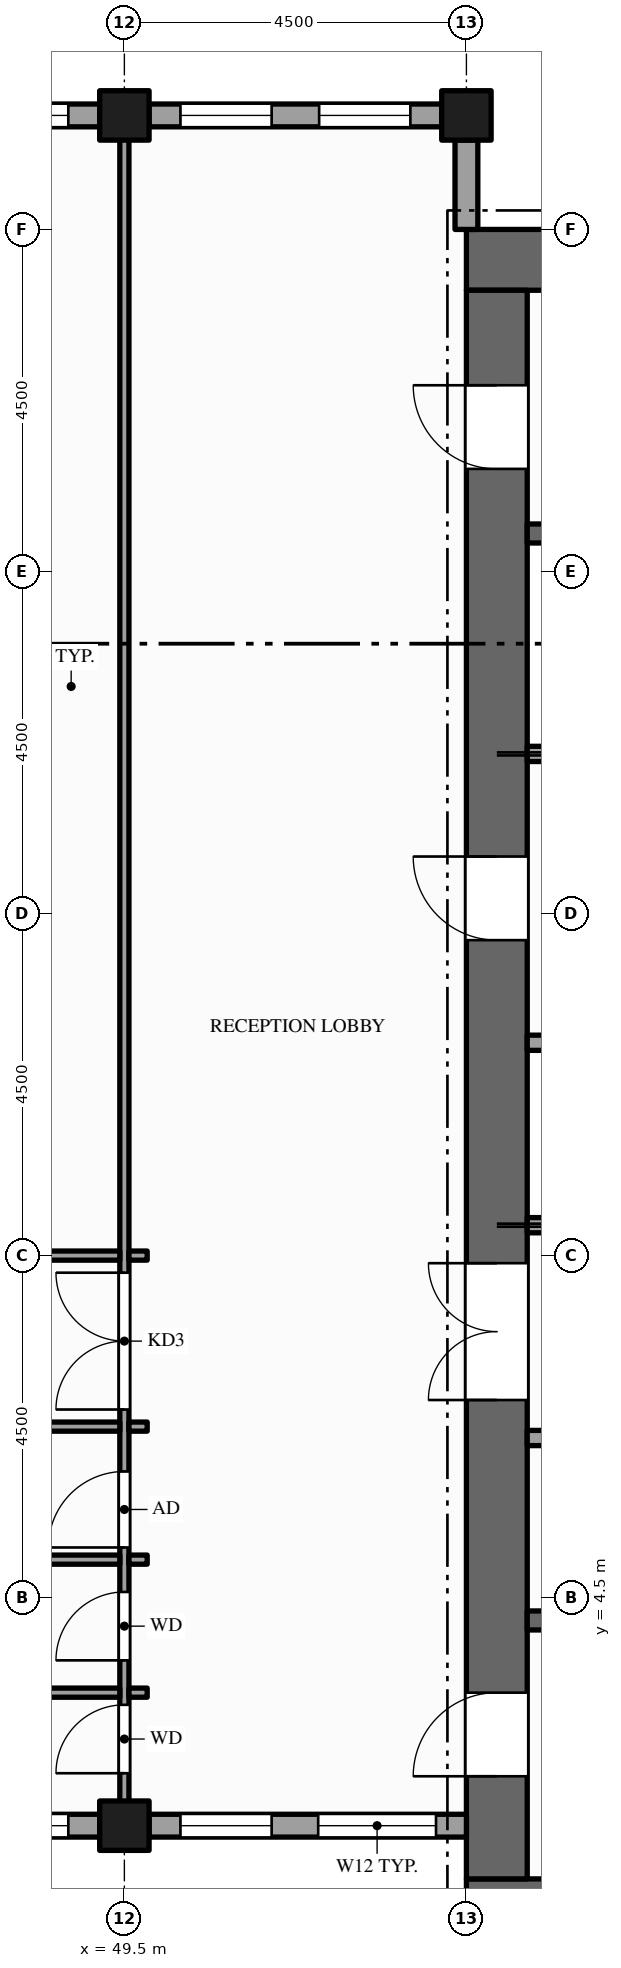
"""IFC4 building model, lengths in metres.
Left out: names, types, materials, properties, quantities, classifications, styles, units other than length and angle.
Written with IfcOpenShell. Run it as: python <this file> out.ifc"""

import sys

from ifc_helpers import new_model, si_unit, direction, frame, frame_2d, origin, origin_2d, place, context, subcontext, project, spatial, rectangle, hollow_rectangle, extrude, element, fill, save


model = new_model("IFC4")
c1 = context("Model", 3, precision=1e-05, world=origin(), true_north=direction((0.0, 1.0)))
c2 = subcontext(c1, "Body", "Model", "MODEL_VIEW")
j1 = project(units=[si_unit("LENGTHUNIT", "METRE"), si_unit("PLANEANGLEUNIT", "RADIAN")], contexts=[c1])
p1 = place(None, origin())
s1 = spatial("IfcSite", under=j1, at=p1, CompositionType="ELEMENT")
p2 = place(p1, origin())
s2 = spatial("IfcBuilding", under=s1, at=p2, CompositionType="ELEMENT")
p3 = place(p2, frame((0.0, 0.0, 273.0)))
s3 = spatial("IfcBuildingStorey", under=s2, at=p3, CompositionType="ELEMENT", Elevation=273.0)
for number, where, z_axis, x_axis in (
    (1, (67.5, 0.4, -0.15), (0.0, 0.0, 1.0), (-1.0, 0.0, 0.0)),
    (2, (54.0, 22.1, -0.15), (0.0, 0.0, 1.0), (1.0, 0.0, 0.0)),
):
    element("IfcWall", number, at=place(p3, frame(where, z_axis=z_axis, x_axis=x_axis)), inside=s3, PredefinedType="SHEAR", context=c2, shape_type="SweptSolid", body=[
        extrude(rectangle(XDim=13.5, YDim=0.8, at=frame_2d((6.75, 0.0))), origin(), (0.0, 0.0, 1.0), 4.0),
    ])
p4 = place(p3, frame((54.4, 0.8, -0.15), z_axis=(0.0, 0.0, 1.0), x_axis=(0.0, 1.0, 0.0)))
e3 = element("IfcWall", 3, at=p4, inside=s3, PredefinedType="SHEAR", context=c2, shape_type="SweptSolid", body=[
    extrude(rectangle(XDim=20.9, YDim=0.8, at=frame_2d((10.45, 0.0))), origin(), (0.0, 0.0, 1.0), 4.0),
])
p5 = place(p4, frame((6.3, 0.0, 0.15)))
e4 = element("IfcOpeningElement", 4, at=p5, cuts=e3, PredefinedType="OPENING", context=c2, shape_type="SweptSolid", body=[
    extrude(rectangle(XDim=1.8, YDim=2.1, at=frame_2d((0.9, 1.05))), frame((0.0, 0.41, 0.0), z_axis=(0.0, -1.0, 0.0), x_axis=(1.0, 0.0, 0.0)), (0.0, 0.0, 1.0), 0.82),
])
p6 = place(p4, frame((12.35, 0.0, 0.15)))
e5 = element("IfcOpeningElement", 5, at=p6, cuts=e3, PredefinedType="OPENING", context=c2, shape_type="SweptSolid", body=[
    extrude(rectangle(XDim=1.1, YDim=2.1, at=frame_2d((0.55, 1.05))), frame((0.0, 0.41, 0.0), z_axis=(0.0, -1.0, 0.0), x_axis=(1.0, 0.0, 0.0)), (0.0, 0.0, 1.0), 0.82),
])
p7 = place(p4, frame((1.35, 0.0, 0.15)))
e6 = element("IfcOpeningElement", 6, at=p7, cuts=e3, PredefinedType="OPENING", context=c2, shape_type="SweptSolid", body=[
    extrude(rectangle(XDim=1.1, YDim=2.1, at=frame_2d((0.55, 1.05))), frame((0.0, 0.41, 0.0), z_axis=(0.0, -1.0, 0.0), x_axis=(1.0, 0.0, 0.0)), (0.0, 0.0, 1.0), 0.82),
])
p8 = place(p4, frame((18.55, 0.0, 0.15)))
e7 = element("IfcOpeningElement", 7, at=p8, cuts=e3, PredefinedType="OPENING", context=c2, shape_type="SweptSolid", body=[
    extrude(rectangle(XDim=1.1, YDim=2.1, at=frame_2d((0.55, 1.05))), frame((0.0, 0.41, 0.0), z_axis=(0.0, -1.0, 0.0), x_axis=(1.0, 0.0, 0.0)), (0.0, 0.0, 1.0), 0.82),
])
for number, where, z_axis, x_axis in (
    (8, (49.5, 1.5, -0.15), (0.0, 0.0, 1.0), (1.0, 0.0, 0.0)),
    (9, (49.5, 24.0, -0.15), (0.0, 0.0, 1.0), (1.0, 0.0, 0.0)),
    (10, (54.0, 24.0, -0.15), (0.0, 0.0, 1.0), (1.0, 0.0, 0.0)),
):
    element("IfcColumn", number, at=place(p3, frame(where, z_axis=z_axis, x_axis=x_axis)), inside=s3, PredefinedType="COLUMN", context=c2, shape_type="SweptSolid", body=[
        extrude(hollow_rectangle(XDim=0.65, YDim=0.65, WallThickness=0.032, at=origin_2d()), origin(), (0.0, 0.0, 1.0), 4.0),
    ])
p9 = place(p3, frame((45.325, 1.5, 0.0), z_axis=(0.0, 0.0, 1.0), x_axis=(1.0, 0.0, 0.0)))
e11 = element("IfcWall", 11, at=p9, inside=s3, PredefinedType="STANDARD", context=c2, shape_type="SweptSolid", body=[
    extrude(rectangle(XDim=3.85, YDim=0.3, at=frame_2d((1.925, 0.0))), origin(), (0.0, 0.0, 1.0), 2.87),
])
p10 = place(p9, frame((0.413, 0.0, 0.9)))
e12 = element("IfcOpeningElement", 12, at=p10, cuts=e11, PredefinedType="OPENING", context=c2, shape_type="SweptSolid", body=[
    extrude(rectangle(XDim=1.2, YDim=1.75, at=frame_2d((0.6, 0.875))), frame((0.0, 0.16, 0.0), z_axis=(0.0, -1.0, 0.0), x_axis=(1.0, 0.0, 0.0)), (0.0, 0.0, 1.0), 0.32),
])
p11 = place(p9, frame((2.238, 0.0, 0.9)))
e13 = element("IfcOpeningElement", 13, at=p11, cuts=e11, PredefinedType="OPENING", context=c2, shape_type="SweptSolid", body=[
    extrude(rectangle(XDim=1.2, YDim=1.75, at=frame_2d((0.6, 0.875))), frame((0.0, 0.16, 0.0), z_axis=(0.0, -1.0, 0.0), x_axis=(1.0, 0.0, 0.0)), (0.0, 0.0, 1.0), 0.32),
])
p12 = place(p3, frame((49.825, 1.5, 0.0), z_axis=(0.0, 0.0, 1.0), x_axis=(1.0, 0.0, 0.0)))
e14 = element("IfcWall", 14, at=p12, inside=s3, PredefinedType="STANDARD", context=c2, shape_type="SweptSolid", body=[
    extrude(rectangle(XDim=4.175, YDim=0.3, at=frame_2d((2.087, 0.0))), origin(), (0.0, 0.0, 1.0), 2.87),
])
p13 = place(p12, frame((0.413, 0.0, 0.9)))
e15 = element("IfcOpeningElement", 15, at=p13, cuts=e14, PredefinedType="OPENING", context=c2, shape_type="SweptSolid", body=[
    extrude(rectangle(XDim=1.2, YDim=1.75, at=frame_2d((0.6, 0.875))), frame((0.0, 0.16, 0.0), z_axis=(0.0, -1.0, 0.0), x_axis=(1.0, 0.0, 0.0)), (0.0, 0.0, 1.0), 0.32),
])
p14 = place(p12, frame((2.225, 0.0, 0.9)))
e16 = element("IfcOpeningElement", 16, at=p14, cuts=e14, PredefinedType="OPENING", context=c2, shape_type="SweptSolid", body=[
    extrude(rectangle(XDim=1.55, YDim=1.75, at=frame_2d((0.775, 0.875))), frame((0.0, 0.16, 0.0), z_axis=(0.0, -1.0, 0.0), x_axis=(1.0, 0.0, 0.0)), (0.0, 0.0, 1.0), 0.32),
])
p15 = place(p3, frame((54.0, 22.5, 0.0), z_axis=(0.0, 0.0, 1.0), x_axis=(0.0, 1.0, 0.0)))
e17 = element("IfcWall", 17, at=p15, inside=s3, PredefinedType="STANDARD", context=c2, shape_type="SweptSolid", body=[
    extrude(rectangle(XDim=1.175, YDim=0.3, at=frame_2d((0.587, 0.0))), origin(), (0.0, 0.0, 1.0), 3.162),
])
p16 = place(p3, frame((53.675, 24.0, 0.0), z_axis=(0.0, 0.0, 1.0), x_axis=(-1.0, 0.0, 0.0)))
e18 = element("IfcWall", 18, at=p16, inside=s3, PredefinedType="STANDARD", context=c2, shape_type="SweptSolid", body=[
    extrude(rectangle(XDim=3.85, YDim=0.3, at=frame_2d((1.925, 0.0))), origin(), (0.0, 0.0, 1.0), 2.87),
])
p17 = place(p16, frame((0.413, 0.0, 0.9)))
e19 = element("IfcOpeningElement", 19, at=p17, cuts=e18, PredefinedType="OPENING", context=c2, shape_type="SweptSolid", body=[
    extrude(rectangle(XDim=1.2, YDim=1.75, at=frame_2d((0.6, 0.875))), frame((0.0, 0.16, 0.0), z_axis=(0.0, -1.0, 0.0), x_axis=(1.0, 0.0, 0.0)), (0.0, 0.0, 1.0), 0.32),
])
p18 = place(p16, frame((2.238, 0.0, 0.9)))
e20 = element("IfcOpeningElement", 20, at=p18, cuts=e18, PredefinedType="OPENING", context=c2, shape_type="SweptSolid", body=[
    extrude(rectangle(XDim=1.2, YDim=1.75, at=frame_2d((0.6, 0.875))), frame((0.0, 0.16, 0.0), z_axis=(0.0, -1.0, 0.0), x_axis=(1.0, 0.0, 0.0)), (0.0, 0.0, 1.0), 0.32),
])
p19 = place(p3, frame((49.175, 24.0, 0.0), z_axis=(0.0, 0.0, 1.0), x_axis=(-1.0, 0.0, 0.0)))
e21 = element("IfcWall", 21, at=p19, inside=s3, PredefinedType="STANDARD", context=c2, shape_type="SweptSolid", body=[
    extrude(rectangle(XDim=3.85, YDim=0.3, at=frame_2d((1.925, 0.0))), origin(), (0.0, 0.0, 1.0), 2.87),
])
p20 = place(p19, frame((0.413, 0.0, 0.9)))
e22 = element("IfcOpeningElement", 22, at=p20, cuts=e21, PredefinedType="OPENING", context=c2, shape_type="SweptSolid", body=[
    extrude(rectangle(XDim=1.2, YDim=1.75, at=frame_2d((0.6, 0.875))), frame((0.0, 0.16, 0.0), z_axis=(0.0, -1.0, 0.0), x_axis=(1.0, 0.0, 0.0)), (0.0, 0.0, 1.0), 0.32),
])
p21 = place(p19, frame((2.238, 0.0, 0.9)))
e23 = element("IfcOpeningElement", 23, at=p21, cuts=e21, PredefinedType="OPENING", context=c2, shape_type="SweptSolid", body=[
    extrude(rectangle(XDim=1.2, YDim=1.75, at=frame_2d((0.6, 0.875))), frame((0.0, 0.16, 0.0), z_axis=(0.0, -1.0, 0.0), x_axis=(1.0, 0.0, 0.0)), (0.0, 0.0, 1.0), 0.32),
])
p22 = place(p3, frame((49.5, 1.65, 0.0), z_axis=(0.0, 0.0, 1.0), x_axis=(0.0, 1.0, 0.0)))
e24 = element("IfcWall", 24, at=p22, inside=s3, PredefinedType="PARTITIONING", context=c2, shape_type="SweptSolid", body=[
    extrude(rectangle(XDim=22.2, YDim=0.12, at=frame_2d((11.1, 0.0))), origin(), (0.0, 0.0, 1.0), 2.87),
])
p23 = place(p22, frame((5.325, 0.0, 0.0)))
e25 = element("IfcOpeningElement", 25, at=p23, cuts=e24, PredefinedType="OPENING", context=c2, shape_type="SweptSolid", body=[
    extrude(rectangle(XDim=1.8, YDim=2.1, at=frame_2d((0.9, 1.05))), frame((0.0, 0.07, 0.0), z_axis=(0.0, -1.0, 0.0), x_axis=(1.0, 0.0, 0.0)), (0.0, 0.0, 1.0), 0.14),
])
p24 = place(p22, frame((0.54, 0.0, 0.0)))
e26 = element("IfcOpeningElement", 26, at=p24, cuts=e24, PredefinedType="OPENING", context=c2, shape_type="SweptSolid", body=[
    extrude(rectangle(XDim=0.9, YDim=2.1, at=frame_2d((0.45, 1.05))), frame((0.0, 0.07, 0.0), z_axis=(0.0, -1.0, 0.0), x_axis=(1.0, 0.0, 0.0)), (0.0, 0.0, 1.0), 0.14),
])
p25 = place(p22, frame((2.025, 0.0, 0.0)))
e27 = element("IfcOpeningElement", 27, at=p25, cuts=e24, PredefinedType="OPENING", context=c2, shape_type="SweptSolid", body=[
    extrude(rectangle(XDim=0.9, YDim=2.1, at=frame_2d((0.45, 1.05))), frame((0.0, 0.07, 0.0), z_axis=(0.0, -1.0, 0.0), x_axis=(1.0, 0.0, 0.0)), (0.0, 0.0, 1.0), 0.14),
])
p26 = place(p22, frame((3.51, 0.0, 0.0)))
e28 = element("IfcOpeningElement", 28, at=p26, cuts=e24, PredefinedType="OPENING", context=c2, shape_type="SweptSolid", body=[
    extrude(rectangle(XDim=1.0, YDim=2.1, at=frame_2d((0.5, 1.05))), frame((0.0, 0.07, 0.0), z_axis=(0.0, -1.0, 0.0), x_axis=(1.0, 0.0, 0.0)), (0.0, 0.0, 1.0), 0.14),
])
p27 = place(p3, frame((45.06, 3.25, 0.0), z_axis=(0.0, 0.0, 1.0), x_axis=(1.0, 0.0, 0.0)))
e29 = element("IfcWall", 29, at=p27, inside=s3, PredefinedType="PARTITIONING", context=c2, shape_type="SweptSolid", body=[
    extrude(rectangle(XDim=4.38, YDim=0.12, at=frame_2d((2.19, 0.0))), origin(), (0.0, 0.0, 1.0), 2.87),
])
p28 = place(p3, frame((49.56, 3.25, 0.0), z_axis=(0.0, 0.0, 1.0), x_axis=(1.0, 0.0, 0.0)))
e30 = element("IfcWall", 30, at=p28, inside=s3, PredefinedType="PARTITIONING", context=c2, shape_type="SweptSolid", body=[
    extrude(rectangle(XDim=0.24, YDim=0.12, at=frame_2d((0.12, 0.0))), origin(), (0.0, 0.0, 1.0), 2.87),
])
p29 = place(p3, frame((54.8, 4.2, 0.0), z_axis=(0.0, 0.0, 1.0), x_axis=(1.0, 0.0, 0.0)))
e31 = element("IfcWall", 31, at=p29, inside=s3, PredefinedType="SHEAR", context=c2, shape_type="SweptSolid", body=[
    extrude(rectangle(XDim=6.475, YDim=0.25, at=frame_2d((3.237, 0.0))), origin(), (0.0, 0.0, 1.0), 3.85),
])
p30 = place(p3, frame((45.06, 5.0, 0.0), z_axis=(0.0, 0.0, 1.0), x_axis=(1.0, 0.0, 0.0)))
e32 = element("IfcWall", 32, at=p30, inside=s3, PredefinedType="PARTITIONING", context=c2, shape_type="SweptSolid", body=[
    extrude(rectangle(XDim=4.38, YDim=0.12, at=frame_2d((2.19, 0.0))), origin(), (0.0, 0.0, 1.0), 2.87),
])
p31 = place(p3, frame((49.56, 5.0, 0.0), z_axis=(0.0, 0.0, 1.0), x_axis=(1.0, 0.0, 0.0)))
e33 = element("IfcWall", 33, at=p31, inside=s3, PredefinedType="PARTITIONING", context=c2, shape_type="SweptSolid", body=[
    extrude(rectangle(XDim=0.24, YDim=0.12, at=frame_2d((0.12, 0.0))), origin(), (0.0, 0.0, 1.0), 2.87),
])
p32 = place(p3, frame((54.8, 6.6, 0.0), z_axis=(0.0, 0.0, 1.0), x_axis=(1.0, 0.0, 0.0)))
e34 = element("IfcWall", 34, at=p32, inside=s3, PredefinedType="PARTITIONING", context=c2, shape_type="SweptSolid", body=[
    extrude(rectangle(XDim=9.05, YDim=0.2, at=frame_2d((4.525, 0.0))), origin(), (0.0, 0.0, 1.0), 3.85),
])
p33 = place(p32, frame((4.075, 0.0, 0.0)))
e35 = element("IfcOpeningElement", 35, at=p33, cuts=e34, PredefinedType="OPENING", context=c2, shape_type="SweptSolid", body=[
    extrude(rectangle(XDim=0.9, YDim=2.1, at=frame_2d((0.45, 1.05))), frame((0.0, 0.11, 0.0), z_axis=(0.0, -1.0, 0.0), x_axis=(1.0, 0.0, 0.0)), (0.0, 0.0, 1.0), 0.22),
])
p34 = place(p3, frame((45.06, 6.75, 0.0), z_axis=(0.0, 0.0, 1.0), x_axis=(1.0, 0.0, 0.0)))
e36 = element("IfcWall", 36, at=p34, inside=s3, PredefinedType="PARTITIONING", context=c2, shape_type="SweptSolid", body=[
    extrude(rectangle(XDim=4.38, YDim=0.12, at=frame_2d((2.19, 0.0))), origin(), (0.0, 0.0, 1.0), 2.87),
])
p35 = place(p3, frame((49.56, 6.75, 0.0), z_axis=(0.0, 0.0, 1.0), x_axis=(1.0, 0.0, 0.0)))
e37 = element("IfcWall", 37, at=p35, inside=s3, PredefinedType="PARTITIONING", context=c2, shape_type="SweptSolid", body=[
    extrude(rectangle(XDim=0.24, YDim=0.12, at=frame_2d((0.12, 0.0))), origin(), (0.0, 0.0, 1.0), 2.87),
])
p36 = place(p3, frame((42.81, 9.0, 0.0), z_axis=(0.0, 0.0, 1.0), x_axis=(1.0, 0.0, 0.0)))
e38 = element("IfcWall", 38, at=p36, inside=s3, PredefinedType="PARTITIONING", context=c2, shape_type="SweptSolid", body=[
    extrude(rectangle(XDim=6.63, YDim=0.12, at=frame_2d((3.315, 0.0))), origin(), (0.0, 0.0, 1.0), 2.87),
])
p37 = place(p36, frame((2.815, 0.0, 0.0)))
e39 = element("IfcOpeningElement", 39, at=p37, cuts=e38, PredefinedType="OPENING", context=c2, shape_type="SweptSolid", body=[
    extrude(rectangle(XDim=1.0, YDim=2.1, at=frame_2d((0.5, 1.05))), frame((0.0, 0.07, 0.0), z_axis=(0.0, -1.0, 0.0), x_axis=(1.0, 0.0, 0.0)), (0.0, 0.0, 1.0), 0.14),
])
p38 = place(p3, frame((49.56, 9.0, 0.0), z_axis=(0.0, 0.0, 1.0), x_axis=(1.0, 0.0, 0.0)))
e40 = element("IfcWall", 40, at=p38, inside=s3, PredefinedType="PARTITIONING", context=c2, shape_type="SweptSolid", body=[
    extrude(rectangle(XDim=0.24, YDim=0.12, at=frame_2d((0.12, 0.0))), origin(), (0.0, 0.0, 1.0), 2.87),
])
p39 = place(p3, frame((54.8, 9.4, 0.0), z_axis=(0.0, 0.0, 1.0), x_axis=(1.0, 0.0, 0.0)))
e41 = element("IfcWall", 41, at=p39, inside=s3, PredefinedType="SOLIDWALL", context=c2, shape_type="SweptSolid", body=[
    extrude(rectangle(XDim=2.5, YDim=0.2, at=frame_2d((1.25, 0.0))), origin(), (0.0, 0.0, 1.0), 3.85),
])
p40 = place(p39, frame((0.7, 0.0, 0.012)))
e42 = element("IfcOpeningElement", 42, at=p40, cuts=e41, PredefinedType="OPENING", context=c2, shape_type="SweptSolid", body=[
    extrude(rectangle(XDim=1.1, YDim=2.1, at=frame_2d((0.55, 1.05))), frame((0.0, 0.11, 0.0), z_axis=(0.0, -1.0, 0.0), x_axis=(1.0, 0.0, 0.0)), (0.0, 0.0, 1.0), 0.22),
])
p41 = place(p3, frame((54.8, 11.8, 0.0), z_axis=(0.0, 0.0, 1.0), x_axis=(1.0, 0.0, 0.0)))
e43 = element("IfcWall", 43, at=p41, inside=s3, PredefinedType="SOLIDWALL", context=c2, shape_type="SweptSolid", body=[
    extrude(rectangle(XDim=2.5, YDim=0.2, at=frame_2d((1.25, 0.0))), origin(), (0.0, 0.0, 1.0), 3.85),
])
p42 = place(p3, frame((54.8, 15.6, 0.0), z_axis=(0.0, 0.0, 1.0), x_axis=(1.0, 0.0, 0.0)))
e44 = element("IfcWall", 44, at=p42, inside=s3, PredefinedType="SOLIDWALL", context=c2, shape_type="SweptSolid", body=[
    extrude(rectangle(XDim=2.5, YDim=0.2, at=frame_2d((1.25, 0.0))), origin(), (0.0, 0.0, 1.0), 3.85),
])
p43 = place(p42, frame((0.7, 0.0, 0.012)))
e45 = element("IfcOpeningElement", 45, at=p43, cuts=e44, PredefinedType="OPENING", context=c2, shape_type="SweptSolid", body=[
    extrude(rectangle(XDim=1.1, YDim=2.1, at=frame_2d((0.55, 1.05))), frame((0.0, 0.11, 0.0), z_axis=(0.0, -1.0, 0.0), x_axis=(1.0, 0.0, 0.0)), (0.0, 0.0, 1.0), 0.22),
])
p44 = place(p3, frame((54.8, 18.5, 0.0), z_axis=(0.0, 0.0, 1.0), x_axis=(1.0, 0.0, 0.0)))
e46 = element("IfcWall", 46, at=p44, inside=s3, PredefinedType="SHEAR", context=c2, shape_type="SweptSolid", body=[
    extrude(rectangle(XDim=6.475, YDim=0.25, at=frame_2d((3.237, 0.0))), origin(), (0.0, 0.0, 1.0), 3.85),
])
p45 = place(p11, origin())
e47 = element("IfcWindow", 47, at=p45, inside=s3, PartitioningType="SINGLE_PANEL", PredefinedType="WINDOW", context=c2, shape_type="SweptSolid", body=[
    extrude(rectangle(XDim=1.2, YDim=1.75, at=frame_2d((0.6, 0.875))), frame((0.0, 0.03, 0.0), z_axis=(0.0, -1.0, 0.0), x_axis=(1.0, 0.0, 0.0)), (0.0, 0.0, 1.0), 0.06),
])
fill(e13, e47)
p46 = place(p13, origin())
e48 = element("IfcWindow", 48, at=p46, inside=s3, PartitioningType="SINGLE_PANEL", PredefinedType="WINDOW", context=c2, shape_type="SweptSolid", body=[
    extrude(rectangle(XDim=1.2, YDim=1.75, at=frame_2d((0.6, 0.875))), frame((0.0, 0.03, 0.0), z_axis=(0.0, -1.0, 0.0), x_axis=(1.0, 0.0, 0.0)), (0.0, 0.0, 1.0), 0.06),
])
fill(e15, e48)
p47 = place(p14, origin())
e49 = element("IfcWindow", 49, at=p47, inside=s3, PartitioningType="SINGLE_PANEL", PredefinedType="WINDOW", context=c2, shape_type="SweptSolid", body=[
    extrude(rectangle(XDim=1.55, YDim=1.75, at=frame_2d((0.775, 0.875))), frame((0.0, 0.03, 0.0), z_axis=(0.0, -1.0, 0.0), x_axis=(1.0, 0.0, 0.0)), (0.0, 0.0, 1.0), 0.06),
])
fill(e16, e49)
p48 = place(p17, origin())
e50 = element("IfcWindow", 50, at=p48, inside=s3, PartitioningType="SINGLE_PANEL", PredefinedType="WINDOW", context=c2, shape_type="SweptSolid", body=[
    extrude(rectangle(XDim=1.2, YDim=1.75, at=frame_2d((0.6, 0.875))), frame((0.0, 0.03, 0.0), z_axis=(0.0, -1.0, 0.0), x_axis=(1.0, 0.0, 0.0)), (0.0, 0.0, 1.0), 0.06),
])
fill(e19, e50)
p49 = place(p18, origin())
e51 = element("IfcWindow", 51, at=p49, inside=s3, PartitioningType="SINGLE_PANEL", PredefinedType="WINDOW", context=c2, shape_type="SweptSolid", body=[
    extrude(rectangle(XDim=1.2, YDim=1.75, at=frame_2d((0.6, 0.875))), frame((0.0, 0.03, 0.0), z_axis=(0.0, -1.0, 0.0), x_axis=(1.0, 0.0, 0.0)), (0.0, 0.0, 1.0), 0.06),
])
fill(e20, e51)
p50 = place(p20, origin())
e52 = element("IfcWindow", 52, at=p50, inside=s3, PartitioningType="SINGLE_PANEL", PredefinedType="WINDOW", context=c2, shape_type="SweptSolid", body=[
    extrude(rectangle(XDim=1.2, YDim=1.75, at=frame_2d((0.6, 0.875))), frame((0.0, 0.03, 0.0), z_axis=(0.0, -1.0, 0.0), x_axis=(1.0, 0.0, 0.0)), (0.0, 0.0, 1.0), 0.06),
])
fill(e22, e52)
p51 = place(p5, origin())
e53 = element("IfcDoor", 53, at=p51, inside=s3, OperationType="DOUBLE_DOOR_SINGLE_SWING", PredefinedType="DOOR", context=c2, shape_type="SweptSolid", body=[
    extrude(rectangle(XDim=1.8, YDim=2.1, at=frame_2d((0.9, 1.05))), frame((0.0, 0.025, 0.0), z_axis=(0.0, -1.0, 0.0), x_axis=(1.0, 0.0, 0.0)), (0.0, 0.0, 1.0), 0.05),
])
fill(e4, e53)
p52 = place(p6, origin())
e54 = element("IfcDoor", 54, at=p52, inside=s3, OperationType="SINGLE_SWING_RIGHT", PredefinedType="DOOR", context=c2, shape_type="SweptSolid", body=[
    extrude(rectangle(XDim=1.1, YDim=2.1, at=frame_2d((0.55, 1.05))), frame((0.0, 0.025, 0.0), z_axis=(0.0, -1.0, 0.0), x_axis=(1.0, 0.0, 0.0)), (0.0, 0.0, 1.0), 0.05),
])
fill(e5, e54)
p53 = place(p7, origin())
e55 = element("IfcDoor", 55, at=p53, inside=s3, OperationType="SINGLE_SWING_LEFT", PredefinedType="DOOR", context=c2, shape_type="SweptSolid", body=[
    extrude(rectangle(XDim=1.1, YDim=2.1, at=frame_2d((0.55, 1.05))), frame((0.0, 0.025, 0.0), z_axis=(0.0, -1.0, 0.0), x_axis=(1.0, 0.0, 0.0)), (0.0, 0.0, 1.0), 0.05),
])
fill(e6, e55)
p54 = place(p8, origin())
e56 = element("IfcDoor", 56, at=p54, inside=s3, OperationType="SINGLE_SWING_RIGHT", PredefinedType="DOOR", context=c2, shape_type="SweptSolid", body=[
    extrude(rectangle(XDim=1.1, YDim=2.1, at=frame_2d((0.55, 1.05))), frame((0.0, 0.025, 0.0), z_axis=(0.0, -1.0, 0.0), x_axis=(1.0, 0.0, 0.0)), (0.0, 0.0, 1.0), 0.05),
])
fill(e7, e56)
p55 = place(p23, origin())
e57 = element("IfcDoor", 57, at=p55, inside=s3, OperationType="DOUBLE_DOOR_SINGLE_SWING", PredefinedType="DOOR", context=c2, shape_type="SweptSolid", body=[
    extrude(rectangle(XDim=1.8, YDim=2.1, at=frame_2d((0.9, 1.05))), frame((0.0, 0.025, 0.0), z_axis=(0.0, -1.0, 0.0), x_axis=(1.0, 0.0, 0.0)), (0.0, 0.0, 1.0), 0.05),
])
fill(e25, e57)
p56 = place(p24, origin())
e58 = element("IfcDoor", 58, at=p56, inside=s3, OperationType="SINGLE_SWING_LEFT", PredefinedType="DOOR", context=c2, shape_type="SweptSolid", body=[
    extrude(rectangle(XDim=0.9, YDim=2.1, at=frame_2d((0.45, 1.05))), frame((0.0, 0.025, 0.0), z_axis=(0.0, -1.0, 0.0), x_axis=(1.0, 0.0, 0.0)), (0.0, 0.0, 1.0), 0.05),
])
fill(e26, e58)
p57 = place(p25, origin())
e59 = element("IfcDoor", 59, at=p57, inside=s3, OperationType="SINGLE_SWING_LEFT", PredefinedType="DOOR", context=c2, shape_type="SweptSolid", body=[
    extrude(rectangle(XDim=0.9, YDim=2.1, at=frame_2d((0.45, 1.05))), frame((0.0, 0.025, 0.0), z_axis=(0.0, -1.0, 0.0), x_axis=(1.0, 0.0, 0.0)), (0.0, 0.0, 1.0), 0.05),
])
fill(e27, e59)
p58 = place(p26, origin())
e60 = element("IfcDoor", 60, at=p58, inside=s3, OperationType="SINGLE_SWING_LEFT", PredefinedType="DOOR", context=c2, shape_type="SweptSolid", body=[
    extrude(rectangle(XDim=1.0, YDim=2.1, at=frame_2d((0.5, 1.05))), frame((0.0, 0.025, 0.0), z_axis=(0.0, -1.0, 0.0), x_axis=(1.0, 0.0, 0.0)), (0.0, 0.0, 1.0), 0.05),
])
fill(e28, e60)
save(model, sys.argv[1])
